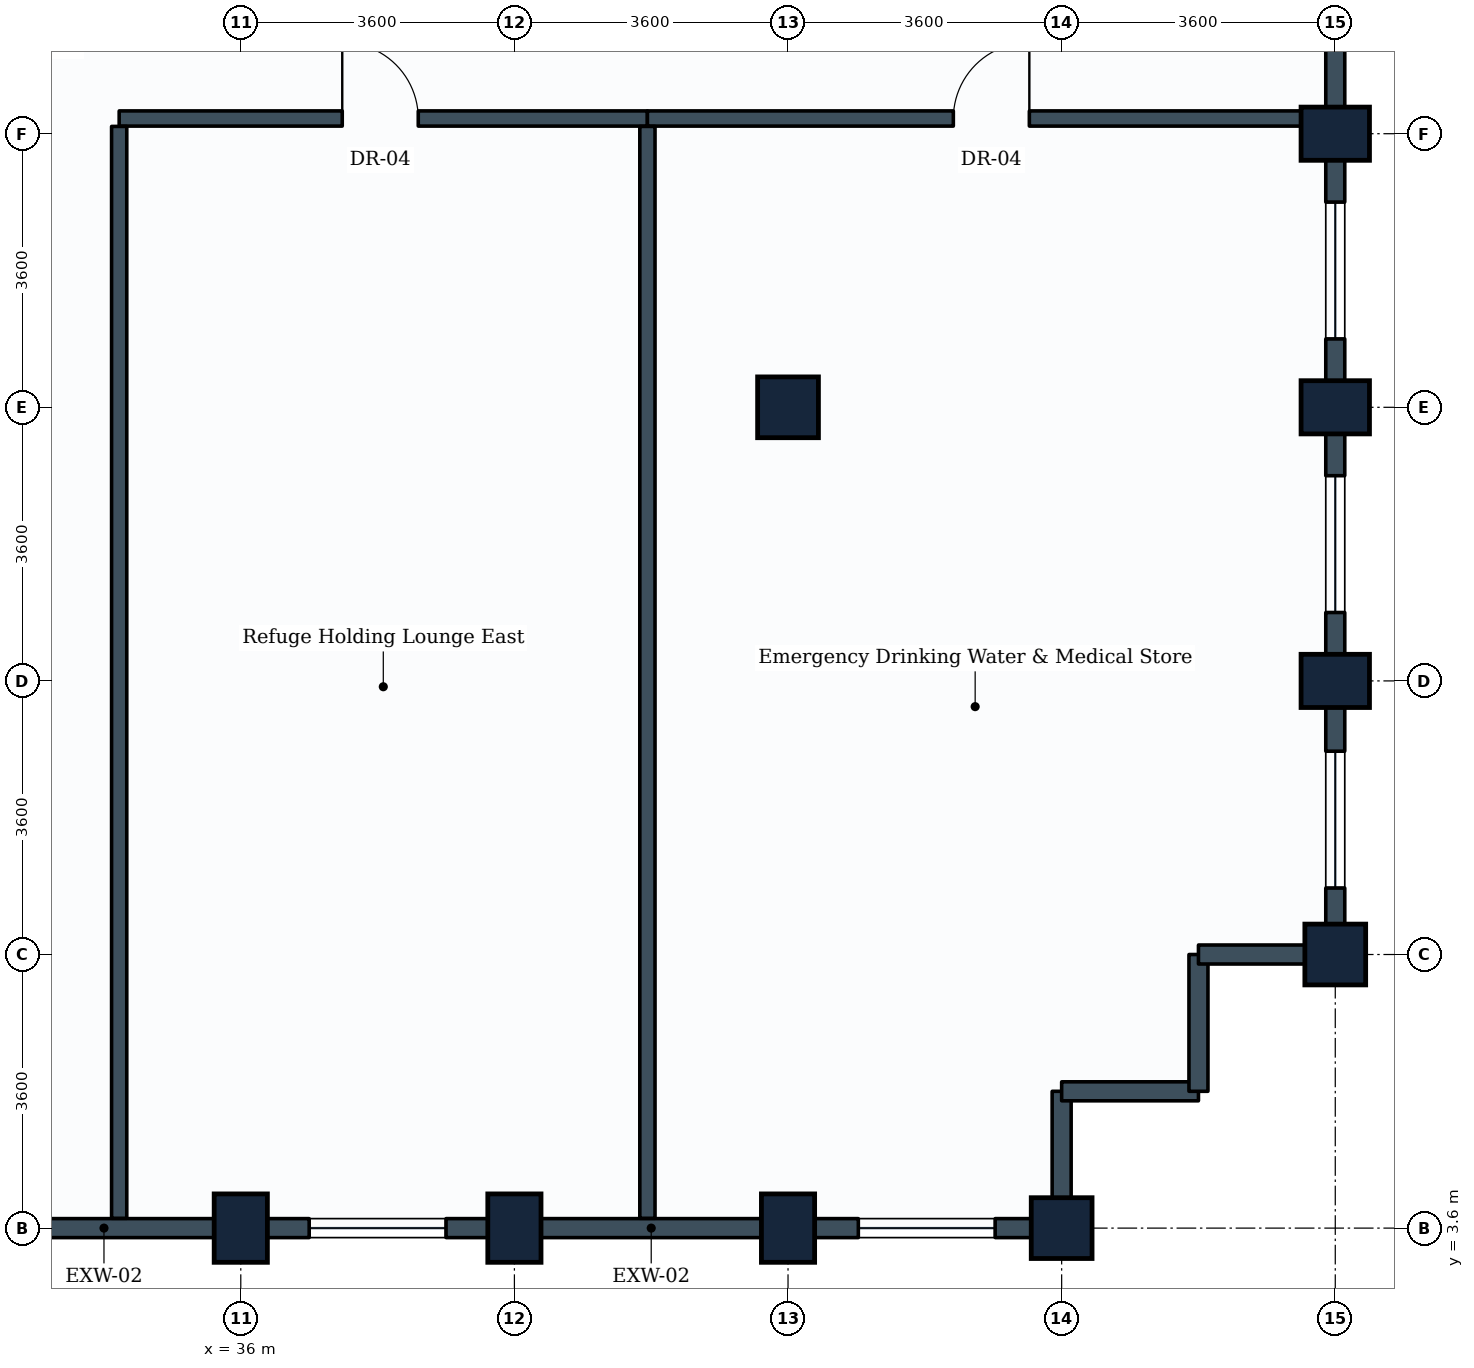
"""IFC4 building model, lengths in metres.
Left out: names, types, materials, properties, quantities, classifications, styles, units other than length and angle.
Written with IfcOpenShell. Run it as: python <this file> out.ifc"""

import sys

from ifc_helpers import new_model, si_unit, direction, frame, frame_2d, origin, origin_2d, place, context, subcontext, project, spatial, rectangle, extrude, element, fill, save


model = new_model("IFC4")
c1 = context("Model", 3, precision=1e-05, world=origin(), true_north=direction((0.0, 1.0)))
c2 = subcontext(c1, "Body", "Model", "MODEL_VIEW")
j1 = project(units=[si_unit("LENGTHUNIT", "METRE"), si_unit("PLANEANGLEUNIT", "RADIAN")], contexts=[c1])
p1 = place(None, origin())
s1 = spatial("IfcSite", under=j1, at=p1, CompositionType="ELEMENT")
p2 = place(p1, origin())
s2 = spatial("IfcBuilding", under=s1, at=p2, CompositionType="ELEMENT")
p3 = place(p2, frame((0.0, 0.0, 213.8)))
s3 = spatial("IfcBuildingStorey", under=s2, at=p3, CompositionType="ELEMENT", Elevation=213.8)
for number, where, z_axis, x_axis in (
    (1, (36.0, 3.6, 0.0), (0.0, 0.0, 1.0), (1.0, 0.0, 0.0)),
    (2, (39.6, 3.6, 0.0), (0.0, 0.0, 1.0), (1.0, 0.0, 0.0)),
    (3, (43.2, 3.6, 0.0), (0.0, 0.0, 1.0), (1.0, 0.0, 0.0)),
):
    element("IfcColumn", number, at=place(p3, frame(where, z_axis=z_axis, x_axis=x_axis)), inside=s3, PredefinedType="COLUMN", context=c2, shape_type="SweptSolid", body=[
        extrude(rectangle(XDim=0.7, YDim=0.9, at=origin_2d()), origin(), (0.0, 0.0, 1.0), 3.6),
    ])
for number, where, z_axis, x_axis in (
    (4, (43.2, 14.4, 0.0), (0.0, 0.0, 1.0), (1.0, 0.0, 0.0)),
    (5, (46.8, 3.6, 0.0), (0.0, 0.0, 1.0), (1.0, 0.0, 0.0)),
    (6, (50.4, 7.2, 0.0), (0.0, 0.0, 1.0), (1.0, 0.0, 0.0)),
):
    element("IfcColumn", number, at=place(p3, frame(where, z_axis=z_axis, x_axis=x_axis)), inside=s3, PredefinedType="COLUMN", context=c2, shape_type="SweptSolid", body=[
        extrude(rectangle(XDim=0.8, YDim=0.8, at=origin_2d()), origin(), (0.0, 0.0, 1.0), 3.6),
    ])
for number, where, z_axis, x_axis in (
    (7, (50.4, 10.8, 0.0), (0.0, 0.0, 1.0), (0.0, 1.0, 0.0)),
    (8, (50.4, 14.4, 0.0), (0.0, 0.0, 1.0), (0.0, 1.0, 0.0)),
    (9, (50.4, 18.0, 0.0), (0.0, 0.0, 1.0), (0.0, 1.0, 0.0)),
):
    element("IfcColumn", number, at=place(p3, frame(where, z_axis=z_axis, x_axis=x_axis)), inside=s3, PredefinedType="COLUMN", context=c2, shape_type="SweptSolid", body=[
        extrude(rectangle(XDim=0.7, YDim=0.9, at=origin_2d()), origin(), (0.0, 0.0, 1.0), 3.6),
    ])
p4 = place(p3, frame((36.0, 3.6, 0.0), z_axis=(0.0, 0.0, 1.0), x_axis=(-1.0, 0.0, 0.0)))
e10 = element("IfcWall", 10, at=p4, inside=s3, PredefinedType="STANDARD", context=c2, shape_type="SweptSolid", body=[
    extrude(rectangle(XDim=3.6, YDim=0.25, at=frame_2d((1.8, 0.0))), origin(), (0.0, 0.0, 1.0), 2.73),
])
p5 = place(p3, frame((39.6, 3.6, 0.0), z_axis=(0.0, 0.0, 1.0), x_axis=(-1.0, 0.0, 0.0)))
e11 = element("IfcWall", 11, at=p5, inside=s3, PredefinedType="STANDARD", context=c2, shape_type="SweptSolid", body=[
    extrude(rectangle(XDim=3.6, YDim=0.25, at=frame_2d((1.8, 0.0))), origin(), (0.0, 0.0, 1.0), 2.73),
])
p6 = place(p5, frame((0.9, 0.0, 0.85)))
e12 = element("IfcOpeningElement", 12, at=p6, cuts=e11, PredefinedType="OPENING", context=c2, shape_type="SweptSolid", body=[
    extrude(rectangle(XDim=1.8, YDim=1.35, at=frame_2d((0.9, 0.675))), frame((0.0, 0.135, 0.0), z_axis=(0.0, -1.0, 0.0), x_axis=(1.0, 0.0, 0.0)), (0.0, 0.0, 1.0), 0.27),
])
p7 = place(p3, frame((43.2, 3.6, 0.0), z_axis=(0.0, 0.0, 1.0), x_axis=(-1.0, 0.0, 0.0)))
e13 = element("IfcWall", 13, at=p7, inside=s3, PredefinedType="STANDARD", context=c2, shape_type="SweptSolid", body=[
    extrude(rectangle(XDim=3.6, YDim=0.25, at=frame_2d((1.8, 0.0))), origin(), (0.0, 0.0, 1.0), 2.73),
])
p8 = place(p3, frame((46.8, 3.6, 0.0), z_axis=(0.0, 0.0, 1.0), x_axis=(-1.0, 0.0, 0.0)))
e14 = element("IfcWall", 14, at=p8, inside=s3, PredefinedType="STANDARD", context=c2, shape_type="SweptSolid", body=[
    extrude(rectangle(XDim=3.6, YDim=0.25, at=frame_2d((1.8, 0.0))), origin(), (0.0, 0.0, 1.0), 2.73),
])
p9 = place(p8, frame((0.875, 0.0, 0.85)))
e15 = element("IfcOpeningElement", 15, at=p9, cuts=e14, PredefinedType="OPENING", context=c2, shape_type="SweptSolid", body=[
    extrude(rectangle(XDim=1.8, YDim=1.35, at=frame_2d((0.9, 0.675))), frame((0.0, 0.135, 0.0), z_axis=(0.0, -1.0, 0.0), x_axis=(1.0, 0.0, 0.0)), (0.0, 0.0, 1.0), 0.27),
])
p10 = place(p3, frame((46.8, 5.4, 0.0), z_axis=(0.0, 0.0, 1.0), x_axis=(0.0, -1.0, 0.0)))
e16 = element("IfcWall", 16, at=p10, inside=s3, PredefinedType="STANDARD", context=c2, shape_type="SweptSolid", body=[
    extrude(rectangle(XDim=1.8, YDim=0.25, at=frame_2d((0.9, 0.0))), origin(), (0.0, 0.0, 1.0), 2.73),
])
for number, where, z_axis, x_axis in (
    (17, (48.6, 5.4, 0.0), (0.0, 0.0, 1.0), (-1.0, 0.0, 0.0)),
    (18, (48.6, 7.2, 0.0), (0.0, 0.0, 1.0), (0.0, -1.0, 0.0)),
):
    element("IfcWall", number, at=place(p3, frame(where, z_axis=z_axis, x_axis=x_axis)), inside=s3, PredefinedType="STANDARD", context=c2, shape_type="SweptSolid", body=[
        extrude(rectangle(XDim=1.8, YDim=0.25, at=frame_2d((0.9, 0.0))), origin(), (0.0, 0.0, 1.0), 3.335),
    ])
p11 = place(p3, frame((50.4, 7.2, 0.0), z_axis=(0.0, 0.0, 1.0), x_axis=(-1.0, 0.0, 0.0)))
e19 = element("IfcWall", 19, at=p11, inside=s3, PredefinedType="STANDARD", context=c2, shape_type="SweptSolid", body=[
    extrude(rectangle(XDim=1.8, YDim=0.25, at=frame_2d((0.9, 0.0))), origin(), (0.0, 0.0, 1.0), 2.73),
])
p12 = place(p3, frame((50.4, 10.8, 0.0), z_axis=(0.0, 0.0, 1.0), x_axis=(0.0, -1.0, 0.0)))
e20 = element("IfcWall", 20, at=p12, inside=s3, PredefinedType="STANDARD", context=c2, shape_type="SweptSolid", body=[
    extrude(rectangle(XDim=3.6, YDim=0.25, at=frame_2d((1.8, 0.0))), origin(), (0.0, 0.0, 1.0), 2.73),
])
p13 = place(p12, frame((0.925, 0.0, 0.85)))
e21 = element("IfcOpeningElement", 21, at=p13, cuts=e20, PredefinedType="OPENING", context=c2, shape_type="SweptSolid", body=[
    extrude(rectangle(XDim=1.8, YDim=1.35, at=frame_2d((0.9, 0.675))), frame((0.0, 0.135, 0.0), z_axis=(0.0, -1.0, 0.0), x_axis=(1.0, 0.0, 0.0)), (0.0, 0.0, 1.0), 0.27),
])
p14 = place(p3, frame((50.4, 14.4, 0.0), z_axis=(0.0, 0.0, 1.0), x_axis=(0.0, -1.0, 0.0)))
e22 = element("IfcWall", 22, at=p14, inside=s3, PredefinedType="STANDARD", context=c2, shape_type="SweptSolid", body=[
    extrude(rectangle(XDim=3.6, YDim=0.25, at=frame_2d((1.8, 0.0))), origin(), (0.0, 0.0, 1.0), 2.73),
])
p15 = place(p14, frame((0.9, 0.0, 0.85)))
e23 = element("IfcOpeningElement", 23, at=p15, cuts=e22, PredefinedType="OPENING", context=c2, shape_type="SweptSolid", body=[
    extrude(rectangle(XDim=1.8, YDim=1.35, at=frame_2d((0.9, 0.675))), frame((0.0, 0.135, 0.0), z_axis=(0.0, -1.0, 0.0), x_axis=(1.0, 0.0, 0.0)), (0.0, 0.0, 1.0), 0.27),
])
p16 = place(p3, frame((50.4, 18.0, 0.0), z_axis=(0.0, 0.0, 1.0), x_axis=(0.0, -1.0, 0.0)))
e24 = element("IfcWall", 24, at=p16, inside=s3, PredefinedType="STANDARD", context=c2, shape_type="SweptSolid", body=[
    extrude(rectangle(XDim=3.6, YDim=0.25, at=frame_2d((1.8, 0.0))), origin(), (0.0, 0.0, 1.0), 2.73),
])
p17 = place(p16, frame((0.9, 0.0, 0.85)))
e25 = element("IfcOpeningElement", 25, at=p17, cuts=e24, PredefinedType="OPENING", context=c2, shape_type="SweptSolid", body=[
    extrude(rectangle(XDim=1.8, YDim=1.35, at=frame_2d((0.9, 0.675))), frame((0.0, 0.135, 0.0), z_axis=(0.0, -1.0, 0.0), x_axis=(1.0, 0.0, 0.0)), (0.0, 0.0, 1.0), 0.27),
])
p18 = place(p3, frame((50.4, 21.6, 0.0), z_axis=(0.0, 0.0, 1.0), x_axis=(0.0, -1.0, 0.0)))
e26 = element("IfcWall", 26, at=p18, inside=s3, PredefinedType="STANDARD", context=c2, shape_type="SweptSolid", body=[
    extrude(rectangle(XDim=3.6, YDim=0.25, at=frame_2d((1.8, 0.0))), origin(), (0.0, 0.0, 1.0), 2.73),
])
p19 = place(p3, frame((34.4, 18.2, 0.0), z_axis=(0.0, 0.0, 1.0), x_axis=(1.0, 0.0, 0.0)))
e27 = element("IfcWall", 27, at=p19, inside=s3, PredefinedType="PARTITIONING", context=c2, shape_type="SweptSolid", body=[
    extrude(rectangle(XDim=6.95, YDim=0.2, at=frame_2d((3.475, 0.0))), origin(), (0.0, 0.0, 1.0), 3.0),
])
p20 = place(p19, frame((2.935, 0.0, 0.0)))
e28 = element("IfcOpeningElement", 28, at=p20, cuts=e27, PredefinedType="OPENING", context=c2, shape_type="SweptSolid", body=[
    extrude(rectangle(XDim=1.0, YDim=2.1, at=frame_2d((0.5, 1.05))), frame((0.0, 0.11, 0.0), z_axis=(0.0, -1.0, 0.0), x_axis=(1.0, 0.0, 0.0)), (0.0, 0.0, 1.0), 0.22),
])
p21 = place(p3, frame((41.35, 18.2, 0.0), z_axis=(0.0, 0.0, 1.0), x_axis=(1.0, 0.0, 0.0)))
e29 = element("IfcWall", 29, at=p21, inside=s3, PredefinedType="PARTITIONING", context=c2, shape_type="SweptSolid", body=[
    extrude(rectangle(XDim=8.921, YDim=0.2, at=frame_2d((4.46, 0.0))), origin(), (0.0, 0.0, 1.0), 2.73),
])
p22 = place(p21, frame((4.025, 0.0, 0.0)))
e30 = element("IfcOpeningElement", 30, at=p22, cuts=e29, PredefinedType="OPENING", context=c2, shape_type="SweptSolid", body=[
    extrude(rectangle(XDim=1.0, YDim=2.1, at=frame_2d((0.5, 1.05))), frame((0.0, 0.11, 0.0), z_axis=(0.0, -1.0, 0.0), x_axis=(1.0, 0.0, 0.0)), (0.0, 0.0, 1.0), 0.22),
])
for number, where, z_axis, x_axis in (
    (31, (34.4, 3.729, 0.0), (0.0, 0.0, 1.0), (0.0, 1.0, 0.0)),
    (32, (41.35, 3.729, 0.0), (0.0, 0.0, 1.0), (0.0, 1.0, 0.0)),
):
    element("IfcWall", number, at=place(p3, frame(where, z_axis=z_axis, x_axis=x_axis)), inside=s3, PredefinedType="PARTITIONING", context=c2, shape_type="SweptSolid", body=[
        extrude(rectangle(XDim=14.367, YDim=0.2, at=frame_2d((7.184, 0.0))), origin(), (0.0, 0.0, 1.0), 2.73),
    ])
p23 = place(p6, origin())
e33 = element("IfcWindow", 33, at=p23, inside=s3, PartitioningType="SINGLE_PANEL", PredefinedType="WINDOW", context=c2, shape_type="SweptSolid", body=[
    extrude(rectangle(XDim=1.8, YDim=1.35, at=frame_2d((0.9, 0.675))), frame((0.0, 0.03, 0.0), z_axis=(0.0, -1.0, 0.0), x_axis=(1.0, 0.0, 0.0)), (0.0, 0.0, 1.0), 0.06),
])
fill(e12, e33)
p24 = place(p9, origin())
e34 = element("IfcWindow", 34, at=p24, inside=s3, PartitioningType="SINGLE_PANEL", PredefinedType="WINDOW", context=c2, shape_type="SweptSolid", body=[
    extrude(rectangle(XDim=1.8, YDim=1.35, at=frame_2d((0.9, 0.675))), frame((0.0, 0.03, 0.0), z_axis=(0.0, -1.0, 0.0), x_axis=(1.0, 0.0, 0.0)), (0.0, 0.0, 1.0), 0.06),
])
fill(e15, e34)
p25 = place(p13, origin())
e35 = element("IfcWindow", 35, at=p25, inside=s3, PartitioningType="SINGLE_PANEL", PredefinedType="WINDOW", context=c2, shape_type="SweptSolid", body=[
    extrude(rectangle(XDim=1.8, YDim=1.35, at=frame_2d((0.9, 0.675))), frame((0.0, 0.03, 0.0), z_axis=(0.0, -1.0, 0.0), x_axis=(1.0, 0.0, 0.0)), (0.0, 0.0, 1.0), 0.06),
])
fill(e21, e35)
p26 = place(p15, origin())
e36 = element("IfcWindow", 36, at=p26, inside=s3, PartitioningType="SINGLE_PANEL", PredefinedType="WINDOW", context=c2, shape_type="SweptSolid", body=[
    extrude(rectangle(XDim=1.8, YDim=1.35, at=frame_2d((0.9, 0.675))), frame((0.0, 0.03, 0.0), z_axis=(0.0, -1.0, 0.0), x_axis=(1.0, 0.0, 0.0)), (0.0, 0.0, 1.0), 0.06),
])
fill(e23, e36)
p27 = place(p17, origin())
e37 = element("IfcWindow", 37, at=p27, inside=s3, PartitioningType="SINGLE_PANEL", PredefinedType="WINDOW", context=c2, shape_type="SweptSolid", body=[
    extrude(rectangle(XDim=1.8, YDim=1.35, at=frame_2d((0.9, 0.675))), frame((0.0, 0.03, 0.0), z_axis=(0.0, -1.0, 0.0), x_axis=(1.0, 0.0, 0.0)), (0.0, 0.0, 1.0), 0.06),
])
fill(e25, e37)
p28 = place(p20, origin())
e38 = element("IfcDoor", 38, at=p28, inside=s3, OperationType="SINGLE_SWING_LEFT", PredefinedType="DOOR", context=c2, shape_type="SweptSolid", body=[
    extrude(rectangle(XDim=1.0, YDim=2.1, at=frame_2d((0.5, 1.05))), frame((0.0, 0.025, 0.0), z_axis=(0.0, -1.0, 0.0), x_axis=(1.0, 0.0, 0.0)), (0.0, 0.0, 1.0), 0.05),
])
fill(e28, e38)
p29 = place(p22, origin())
e39 = element("IfcDoor", 39, at=p29, inside=s3, OperationType="SINGLE_SWING_RIGHT", PredefinedType="DOOR", context=c2, shape_type="SweptSolid", body=[
    extrude(rectangle(XDim=1.0, YDim=2.1, at=frame_2d((0.5, 1.05))), frame((0.0, 0.025, 0.0), z_axis=(0.0, -1.0, 0.0), x_axis=(1.0, 0.0, 0.0)), (0.0, 0.0, 1.0), 0.05),
])
fill(e30, e39)
save(model, sys.argv[1])
